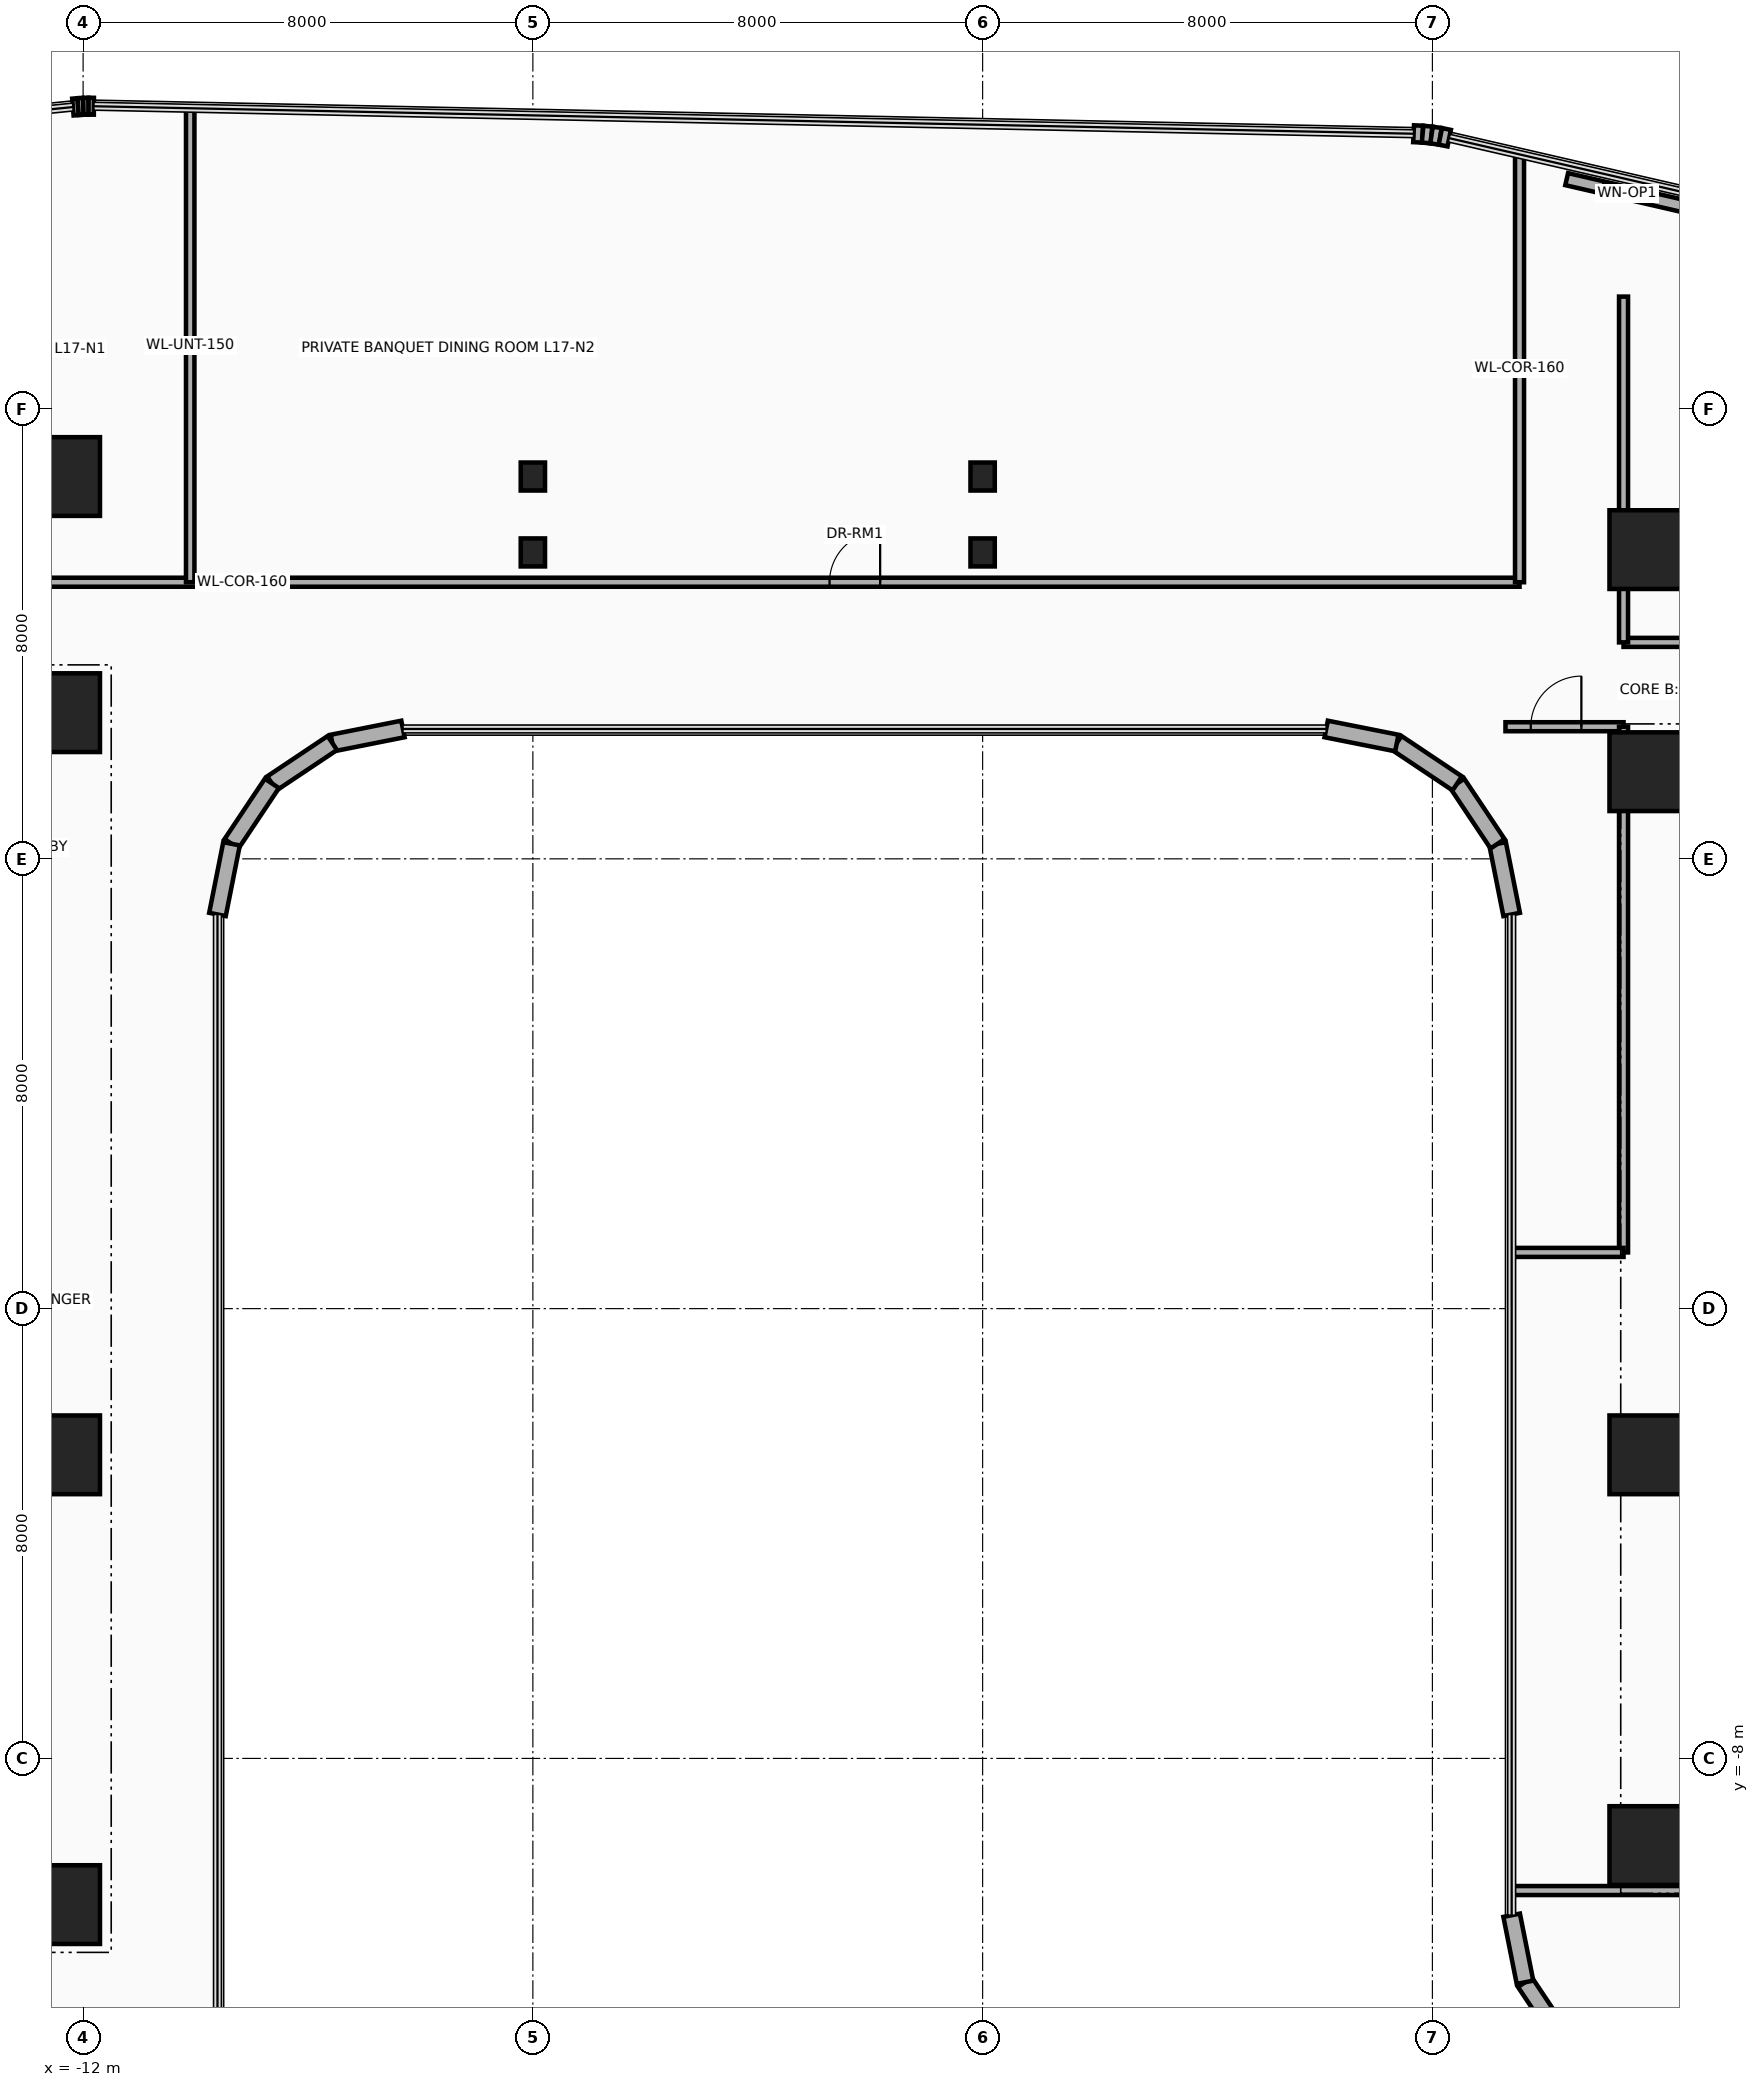
"""IFC4 building model, lengths in metres.
Left out: names, types, materials, properties, quantities, classifications, styles, units other than length and angle.
Written with IfcOpenShell. Run it as: python <this file> out.ifc"""

import sys

from ifc_helpers import new_model, si_unit, direction, frame, frame_2d, origin, origin_2d, place, context, subcontext, project, spatial, rectangle, i_section, extrude, source, transform, mapped, element, fill, save


model = new_model("IFC4")
c1 = context("Model", 3, precision=1e-05, world=origin(), true_north=direction((0.0, 1.0)))
c2 = subcontext(c1, "Body", "Model", "MODEL_VIEW")
j1 = project(units=[si_unit("LENGTHUNIT", "METRE"), si_unit("PLANEANGLEUNIT", "RADIAN")], contexts=[c1])
p1 = place(None, origin())
s1 = spatial("IfcSite", under=j1, at=p1, CompositionType="ELEMENT")
p2 = place(p1, origin())
s2 = spatial("IfcBuilding", under=s1, at=p2, CompositionType="ELEMENT")
p3 = place(p2, frame((0.0, 0.0, 70.4)))
s3 = spatial("IfcBuildingStorey", under=s2, at=p3, CompositionType="ELEMENT", Elevation=70.4)
for number, where, z_axis, x_axis in (
    (1, (-22.65, 10.8, 0.0), (0.0, 0.0, 1.0), (1.0, 0.0, 0.0)),
    (2, (-22.65, -10.8, 0.0), (0.0, 0.0, 1.0), (1.0, 0.0, 0.0)),
):
    element("IfcWall", number, at=place(p3, frame(where, z_axis=z_axis, x_axis=x_axis)), inside=s3, PredefinedType="SHEAR", context=c2, shape_type="SweptSolid", body=[
        extrude(rectangle(XDim=10.25, YDim=0.7, at=frame_2d((5.125, 0.0))), origin(), (0.0, 0.0, 1.0), 3.46),
    ])
for number, where, z_axis, x_axis in (
    (3, (15.85, 9.55, 0.0), (0.0, 0.0, 1.0), (1.0, 0.0, 0.0)),
    (4, (15.85, -9.55, 0.0), (0.0, 0.0, 1.0), (1.0, 0.0, 0.0)),
):
    element("IfcWall", number, at=place(p3, frame(where, z_axis=z_axis, x_axis=x_axis)), inside=s3, PredefinedType="SHEAR", context=c2, shape_type="SweptSolid", body=[
        extrude(rectangle(XDim=9.0, YDim=0.7, at=frame_2d((4.5, 0.0))), origin(), (0.0, 0.0, 1.0), 3.46),
    ])
m1 = source(origin(), c2, "Body", "SweptSolid", [
    extrude(rectangle(XDim=1.4, YDim=1.4, at=origin_2d()), origin(), (0.0, 0.0, 1.0), 3.7),
])
for number, where, z_axis, x_axis in (
    (5, (-12.4, -10.6, 0.0), (0.0, 0.0, 1.0), (1.0, 0.0, 0.0)),
    (6, (-12.4, -2.6, 0.0), (0.0, 0.0, 1.0), (1.0, 0.0, 0.0)),
    (7, (-12.4, 10.6, 0.0), (0.0, 0.0, 1.0), (1.0, 0.0, 0.0)),
    (8, (-12.4, 14.8, 0.0), (0.0, 0.0, 1.0), (1.0, 0.0, 0.0)),
    (9, (15.85, -9.55, 0.0), (0.0, 0.0, 1.0), (1.0, 0.0, 0.0)),
    (10, (15.85, -2.6, 0.0), (0.0, 0.0, 1.0), (1.0, 0.0, 0.0)),
    (11, (15.85, 9.55, 0.0), (0.0, 0.0, 1.0), (1.0, 0.0, 0.0)),
    (12, (15.85, 13.5, 0.0), (0.0, 0.0, 1.0), (1.0, 0.0, 0.0)),
):
    element("IfcColumn", number, at=place(p3, frame(where, z_axis=z_axis, x_axis=x_axis)), inside=s3, PredefinedType="COLUMN", context=c2, shape_type="MappedRepresentation", body=[
        mapped(m1, transform((0.0, 0.0, 0.0), x_axis=(1.0, 0.0, 0.0), y_axis=(0.0, 1.0, 0.0), z_axis=(0.0, 0.0, 1.0), scale=1.0)),
    ])
m2 = source(origin(), c2, "Body", "SweptSolid", [
    extrude(i_section(OverallWidth=0.432, OverallDepth=0.498, WebThickness=0.056, FlangeThickness=0.089, at=origin_2d()), origin(), (0.0, 0.0, 1.0), 3.7),
])
for number, where, z_axis, x_axis in (
    (13, (-4.0, 13.45, 0.0), (0.0, 0.0, 1.0), (1.0, 0.0, 0.0)),
    (14, (-4.0, 14.8, 0.0), (0.0, 0.0, 1.0), (1.0, 0.0, 0.0)),
    (15, (4.0, 13.45, 0.0), (0.0, 0.0, 1.0), (1.0, 0.0, 0.0)),
    (16, (4.0, 14.8, 0.0), (0.0, 0.0, 1.0), (1.0, 0.0, 0.0)),
):
    element("IfcColumn", number, at=place(p3, frame(where, z_axis=z_axis, x_axis=x_axis)), inside=s3, PredefinedType="COLUMN", context=c2, shape_type="MappedRepresentation", body=[
        mapped(m2, transform((0.0, 0.0, 0.0), x_axis=(1.0, 0.0, 0.0), y_axis=(0.0, 1.0, 0.0), z_axis=(0.0, 0.0, 1.0), scale=1.0)),
    ])
p4 = place(p3, frame((-12.182, 21.371, 0.0), z_axis=(0.0, 0.0, 1.0), x_axis=(0.996527790842, 0.08326080759, 0.0)))
e17 = element("IfcWall", 17, at=p4, inside=s3, PredefinedType="SOLIDWALL", context=c2, shape_type="SweptSolid", body=[
    extrude(rectangle(XDim=0.094, YDim=0.3, at=frame_2d((0.047, 0.0))), origin(), (0.0, 0.0, 1.0), 3.46),
])
p5 = place(p3, frame((-12.088, 21.379, 0.0), z_axis=(0.0, 0.0, 1.0), x_axis=(0.998476480444, 0.055178963393, 0.0)))
e18 = element("IfcWall", 18, at=p5, inside=s3, PredefinedType="SOLIDWALL", context=c2, shape_type="SweptSolid", body=[
    extrude(rectangle(XDim=0.093, YDim=0.3, at=frame_2d((0.046, 0.0))), origin(), (0.0, 0.0, 1.0), 3.46),
])
p6 = place(p3, frame((-11.996, 21.384, 0.0), z_axis=(0.0, 0.0, 1.0), x_axis=(0.999722573757, 0.023553673204, 0.0)))
e19 = element("IfcWall", 19, at=p6, inside=s3, PredefinedType="SOLIDWALL", context=c2, shape_type="SweptSolid", body=[
    extrude(rectangle(XDim=0.093, YDim=0.3, at=frame_2d((0.047, 0.0))), origin(), (0.0, 0.0, 1.0), 3.46),
])
p7 = place(p3, frame((-11.902, 21.386, 0.0), z_axis=(0.0, 0.0, 1.0), x_axis=(0.999986507273, -0.005194735103, 0.0)))
e20 = element("IfcWall", 20, at=p7, inside=s3, PredefinedType="SOLIDWALL", context=c2, shape_type="SweptSolid", body=[
    extrude(rectangle(XDim=0.094, YDim=0.3, at=frame_2d((0.047, 0.0))), origin(), (0.0, 0.0, 1.0), 3.46),
])
p8 = place(p3, frame((11.666, 20.897, 0.0), z_axis=(0.0, 0.0, 1.0), x_axis=(0.998885297239, -0.047203421059, 0.0)))
e21 = element("IfcWall", 21, at=p8, inside=s3, PredefinedType="SOLIDWALL", context=c2, shape_type="SweptSolid", body=[
    extrude(rectangle(XDim=0.16, YDim=0.3, at=frame_2d((0.08, 0.0))), origin(), (0.0, 0.0, 1.0), 3.46),
])
p9 = place(p3, frame((11.826, 20.889, 0.0), z_axis=(0.0, 0.0, 1.0), x_axis=(0.995172891136, -0.098137234257, 0.0)))
e22 = element("IfcWall", 22, at=p9, inside=s3, PredefinedType="SOLIDWALL", context=c2, shape_type="SweptSolid", body=[
    extrude(rectangle(XDim=0.159, YDim=0.3, at=frame_2d((0.08, 0.0))), origin(), (0.0, 0.0, 1.0), 3.46),
])
p10 = place(p3, frame((11.984, 20.874, 0.0), z_axis=(0.0, 0.0, 1.0), x_axis=(0.988846069207, -0.148941100486, 0.0)))
e23 = element("IfcWall", 23, at=p10, inside=s3, PredefinedType="SOLIDWALL", context=c2, shape_type="SweptSolid", body=[
    extrude(rectangle(XDim=0.159, YDim=0.3, at=frame_2d((0.08, 0.0))), origin(), (0.0, 0.0, 1.0), 3.46),
])
p11 = place(p3, frame((12.142, 20.85, 0.0), z_axis=(0.0, 0.0, 1.0), x_axis=(0.979991950448, -0.19903712482, 0.0)))
e24 = element("IfcWall", 24, at=p11, inside=s3, PredefinedType="SOLIDWALL", context=c2, shape_type="SweptSolid", body=[
    extrude(rectangle(XDim=0.161, YDim=0.3, at=frame_2d((0.08, 0.0))), origin(), (0.0, 0.0, 1.0), 3.46),
])
p12 = place(p3, frame((14.389, 20.09, 0.0), z_axis=(0.0, 0.0, 1.0), x_axis=(0.974400545997, -0.224818984875, 0.0)))
e25 = element("IfcWall", 25, at=p12, inside=s3, PredefinedType="SOLIDWALL", context=c2, shape_type="SweptSolid", body=[
    extrude(rectangle(XDim=2.2, YDim=0.22, at=frame_2d((1.1, 0.0))), origin(), (0.0, 0.0, 1.0), 3.46),
])
p13 = place(p12, frame((0.65, 0.0, 0.95)))
e26 = element("IfcOpeningElement", 26, at=p13, cuts=e25, PredefinedType="OPENING", context=c2, shape_type="SweptSolid", body=[
    extrude(rectangle(XDim=0.9, YDim=1.3, at=frame_2d((0.45, 0.65))), frame((0.0, 0.125, 0.0), z_axis=(0.0, -1.0, 0.0), x_axis=(1.0, 0.0, 0.0)), (0.0, 0.0, 1.0), 0.25),
])
p14 = place(p3, frame((14.317, -12.983, 0.0), z_axis=(0.0, 0.0, 1.0), x_axis=(-0.555635100982, 0.831426265255, 0.0)))
e27 = element("IfcWall", 27, at=p14, inside=s3, PredefinedType="SOLIDWALL", context=c2, shape_type="SweptSolid", body=[
    extrude(rectangle(XDim=1.205, YDim=0.3, at=frame_2d((0.603, 0.0))), origin(), (0.0, 0.0, 1.0), 3.46),
])
p15 = place(p3, frame((13.647, -11.982, 0.0), z_axis=(0.0, 0.0, 1.0), x_axis=(-0.195189223115, 0.980765602568, 0.0)))
e28 = element("IfcWall", 28, at=p15, inside=s3, PredefinedType="SOLIDWALL", context=c2, shape_type="SweptSolid", body=[
    extrude(rectangle(XDim=1.216, YDim=0.3, at=frame_2d((0.608, 0.0))), origin(), (0.0, 0.0, 1.0), 3.46),
])
p16 = place(p3, frame((13.41, 7.011, 0.0), z_axis=(0.0, 0.0, 1.0), x_axis=(-0.195090163074, 0.980785312019, 0.0)))
e29 = element("IfcWall", 29, at=p16, inside=s3, PredefinedType="SOLIDWALL", context=c2, shape_type="SweptSolid", body=[
    extrude(rectangle(XDim=1.281, YDim=0.3, at=frame_2d((0.641, 0.0))), origin(), (0.0, 0.0, 1.0), 3.46),
])
for number, where, z_axis, x_axis in (
    (30, (13.16, 8.268, 0.0), (0.0, 0.0, 1.0), (-0.556, 0.831, 0.0)),
    (31, (12.442, 9.342, 0.0), (0.0, 0.0, 1.0), (-0.831, 0.556, 0.0)),
):
    element("IfcWall", number, at=place(p3, frame(where, z_axis=z_axis, x_axis=x_axis)), inside=s3, PredefinedType="SOLIDWALL", context=c2, shape_type="SweptSolid", body=[
        extrude(rectangle(XDim=1.292, YDim=0.3, at=frame_2d((0.646, 0.0))), origin(), (0.0, 0.0, 1.0), 3.46),
    ])
for number, where, z_axis, x_axis in (
    (32, (11.367, 10.06, 0.0), (0.0, 0.0, 1.0), (-0.981, 0.195, 0.0)),
    (33, (-6.311, 10.31, 0.0), (0.0, 0.0, 1.0), (-0.981, -0.195, 0.0)),
):
    element("IfcWall", number, at=place(p3, frame(where, z_axis=z_axis, x_axis=x_axis)), inside=s3, PredefinedType="SOLIDWALL", context=c2, shape_type="SweptSolid", body=[
        extrude(rectangle(XDim=1.281, YDim=0.3, at=frame_2d((0.641, 0.0))), origin(), (0.0, 0.0, 1.0), 3.46),
    ])
p17 = place(p3, frame((-7.567, 10.06, 0.0), z_axis=(0.0, 0.0, 1.0), x_axis=(-0.831497739511, -0.555528135371, 0.0)))
e34 = element("IfcWall", 34, at=p17, inside=s3, PredefinedType="SOLIDWALL", context=c2, shape_type="SweptSolid", body=[
    extrude(rectangle(XDim=1.292, YDim=0.3, at=frame_2d((0.646, 0.0))), origin(), (0.0, 0.0, 1.0), 3.46),
])
p18 = place(p3, frame((-8.642, 9.342, 0.0), z_axis=(0.0, 0.0, 1.0), x_axis=(-0.555615398575, -0.831439431869, 0.0)))
e35 = element("IfcWall", 35, at=p18, inside=s3, PredefinedType="SOLIDWALL", context=c2, shape_type="SweptSolid", body=[
    extrude(rectangle(XDim=1.292, YDim=0.3, at=frame_2d((0.646, 0.0))), origin(), (0.0, 0.0, 1.0), 3.46),
])
p19 = place(p3, frame((-9.36, 8.268, 0.0), z_axis=(0.0, 0.0, 1.0), x_axis=(-0.195090163074, -0.980785312019, 0.0)))
e36 = element("IfcWall", 36, at=p19, inside=s3, PredefinedType="SOLIDWALL", context=c2, shape_type="SweptSolid", body=[
    extrude(rectangle(XDim=1.281, YDim=0.3, at=frame_2d((0.641, 0.0))), origin(), (0.0, 0.0, 1.0), 3.46),
])
p20 = place(p3, frame((-31.89, 12.92, 0.0), z_axis=(0.0, 0.0, 1.0), x_axis=(1.0, 0.0, 0.0)))
e37 = element("IfcWall", 37, at=p20, inside=s3, PredefinedType="PARTITIONING", context=c2, shape_type="SweptSolid", body=[
    extrude(rectangle(XDim=45.44, YDim=0.16, at=frame_2d((22.72, 0.0))), origin(), (0.0, 0.0, 1.0), 2.583),
])
p21 = place(p20, frame((10.448, 0.0, 0.0)))
e38 = element("IfcOpeningElement", 38, at=p21, cuts=e37, PredefinedType="OPENING", context=c2, shape_type="SweptSolid", body=[
    extrude(rectangle(XDim=0.9, YDim=2.1, at=frame_2d((0.45, 1.05))), frame((0.0, 0.095, 0.0), z_axis=(0.0, -1.0, 0.0), x_axis=(1.0, 0.0, 0.0)), (0.0, 0.0, 1.0), 0.19),
])
p22 = place(p20, frame((33.167, 0.0, 0.0)))
e39 = element("IfcOpeningElement", 39, at=p22, cuts=e37, PredefinedType="OPENING", context=c2, shape_type="SweptSolid", body=[
    extrude(rectangle(XDim=0.9, YDim=2.1, at=frame_2d((0.45, 1.05))), frame((0.0, 0.095, 0.0), z_axis=(0.0, -1.0, 0.0), x_axis=(1.0, 0.0, 0.0)), (0.0, 0.0, 1.0), 0.19),
])
p23 = place(p3, frame((13.55, 12.92, 0.0), z_axis=(0.0, 0.0, 1.0), x_axis=(0.0, 1.0, 0.0)))
e40 = element("IfcWall", 40, at=p23, inside=s3, PredefinedType="PARTITIONING", context=c2, shape_type="SweptSolid", body=[
    extrude(rectangle(XDim=7.609, YDim=0.16, at=frame_2d((3.805, 0.0))), origin(), (0.0, 0.0, 1.0), 2.583),
])
p24 = place(p3, frame((-10.095, 12.92, 0.0), z_axis=(0.0, 0.0, 1.0), x_axis=(0.0, 1.0, 0.0)))
e41 = element("IfcWall", 41, at=p24, inside=s3, PredefinedType="PARTITIONING", context=c2, shape_type="SweptSolid", body=[
    extrude(rectangle(XDim=8.43, YDim=0.15, at=frame_2d((4.215, 0.0))), origin(), (0.0, 0.0, 1.0), 2.583),
])
p25 = place(p3, frame((15.4, 11.85, 0.0), z_axis=(0.0, 0.0, 1.0), x_axis=(1.0, 0.0, 0.0)))
e42 = element("IfcWall", 42, at=p25, inside=s3, PredefinedType="PARTITIONING", context=c2, shape_type="SweptSolid", body=[
    extrude(rectangle(XDim=10.2, YDim=0.16, at=frame_2d((5.1, 0.0))), origin(), (0.0, 0.0, 1.0), 2.834),
])
p26 = place(p25, frame((4.65, 0.0, 0.0)))
e43 = element("IfcOpeningElement", 43, at=p26, cuts=e42, PredefinedType="OPENING", context=c2, shape_type="SweptSolid", body=[
    extrude(rectangle(XDim=0.9, YDim=2.1, at=frame_2d((0.45, 1.05))), frame((0.0, 0.095, 0.0), z_axis=(0.0, -1.0, 0.0), x_axis=(1.0, 0.0, 0.0)), (0.0, 0.0, 1.0), 0.19),
])
p27 = place(p3, frame((15.4, 11.85, 0.0), z_axis=(0.0, 0.0, 1.0), x_axis=(0.0, 1.0, 0.0)))
e44 = element("IfcWall", 44, at=p27, inside=s3, PredefinedType="PARTITIONING", context=c2, shape_type="SweptSolid", body=[
    extrude(rectangle(XDim=6.15, YDim=0.16, at=frame_2d((3.075, 0.0))), origin(), (0.0, 0.0, 1.0), 2.583),
])
p28 = place(p3, frame((13.41, -10.35, 0.0), z_axis=(0.0, 0.0, 1.0), x_axis=(1.0, 0.0, 0.0)))
e45 = element("IfcWall", 45, at=p28, inside=s3, PredefinedType="PARTITIONING", context=c2, shape_type="SweptSolid", body=[
    extrude(rectangle(XDim=12.19, YDim=0.16, at=frame_2d((6.095, 0.0))), origin(), (0.0, 0.0, 1.0), 3.46),
])
p29 = place(p3, frame((13.3, 10.35, 0.0), z_axis=(0.0, 0.0, 1.0), x_axis=(1.0, 0.0, 0.0)))
e46 = element("IfcWall", 46, at=p29, inside=s3, PredefinedType="PARTITIONING", context=c2, shape_type="SweptSolid", body=[
    extrude(rectangle(XDim=2.1, YDim=0.16, at=frame_2d((1.05, 0.0))), origin(), (0.0, 0.0, 1.0), 2.583),
])
p30 = place(p29, frame((0.45, 0.0, 0.0)))
e47 = element("IfcOpeningElement", 47, at=p30, cuts=e46, PredefinedType="OPENING", context=c2, shape_type="SweptSolid", body=[
    extrude(rectangle(XDim=0.9, YDim=2.1, at=frame_2d((0.45, 1.05))), frame((0.0, 0.095, 0.0), z_axis=(0.0, -1.0, 0.0), x_axis=(1.0, 0.0, 0.0)), (0.0, 0.0, 1.0), 0.19),
])
p31 = place(p3, frame((15.4, 1.0, 0.0), z_axis=(0.0, 0.0, 1.0), x_axis=(0.0, 1.0, 0.0)))
e48 = element("IfcWall", 48, at=p31, inside=s3, PredefinedType="PARTITIONING", context=c2, shape_type="SweptSolid", body=[
    extrude(rectangle(XDim=9.35, YDim=0.16, at=frame_2d((4.675, 0.0))), origin(), (0.0, 0.0, 1.0), 2.245),
])
p32 = place(p3, frame((13.41, 1.0, 0.0), z_axis=(0.0, 0.0, 1.0), x_axis=(1.0, 0.0, 0.0)))
e49 = element("IfcWall", 49, at=p32, inside=s3, PredefinedType="PARTITIONING", context=c2, shape_type="SweptSolid", body=[
    extrude(rectangle(XDim=1.99, YDim=0.16, at=frame_2d((0.995, 0.0))), origin(), (0.0, 0.0, 1.0), 2.245),
])
p33 = place(p13, origin())
e50 = element("IfcWindow", 50, at=p33, inside=s3, PartitioningType="SINGLE_PANEL", PredefinedType="WINDOW", context=c2, shape_type="SweptSolid", body=[
    extrude(rectangle(XDim=0.9, YDim=1.3, at=frame_2d((0.45, 0.65))), frame((0.0, 0.03, 0.0), z_axis=(0.0, -1.0, 0.0), x_axis=(1.0, 0.0, 0.0)), (0.0, 0.0, 1.0), 0.06),
])
fill(e26, e50)
p34 = place(p22, origin())
e51 = element("IfcDoor", 51, at=p34, inside=s3, OperationType="SINGLE_SWING_RIGHT", PredefinedType="DOOR", context=c2, shape_type="SweptSolid", body=[
    extrude(rectangle(XDim=0.9, YDim=2.1, at=frame_2d((0.45, 1.05))), frame((0.0, 0.025, 0.0), z_axis=(0.0, -1.0, 0.0), x_axis=(1.0, 0.0, 0.0)), (0.0, 0.0, 1.0), 0.05),
])
fill(e39, e51)
p35 = place(p30, origin())
e52 = element("IfcDoor", 52, at=p35, inside=s3, OperationType="SINGLE_SWING_RIGHT", PredefinedType="DOOR", context=c2, shape_type="SweptSolid", body=[
    extrude(rectangle(XDim=0.9, YDim=2.1, at=frame_2d((0.45, 1.05))), frame((0.0, 0.025, 0.0), z_axis=(0.0, -1.0, 0.0), x_axis=(1.0, 0.0, 0.0)), (0.0, 0.0, 1.0), 0.05),
])
fill(e47, e52)
save(model, sys.argv[1])
